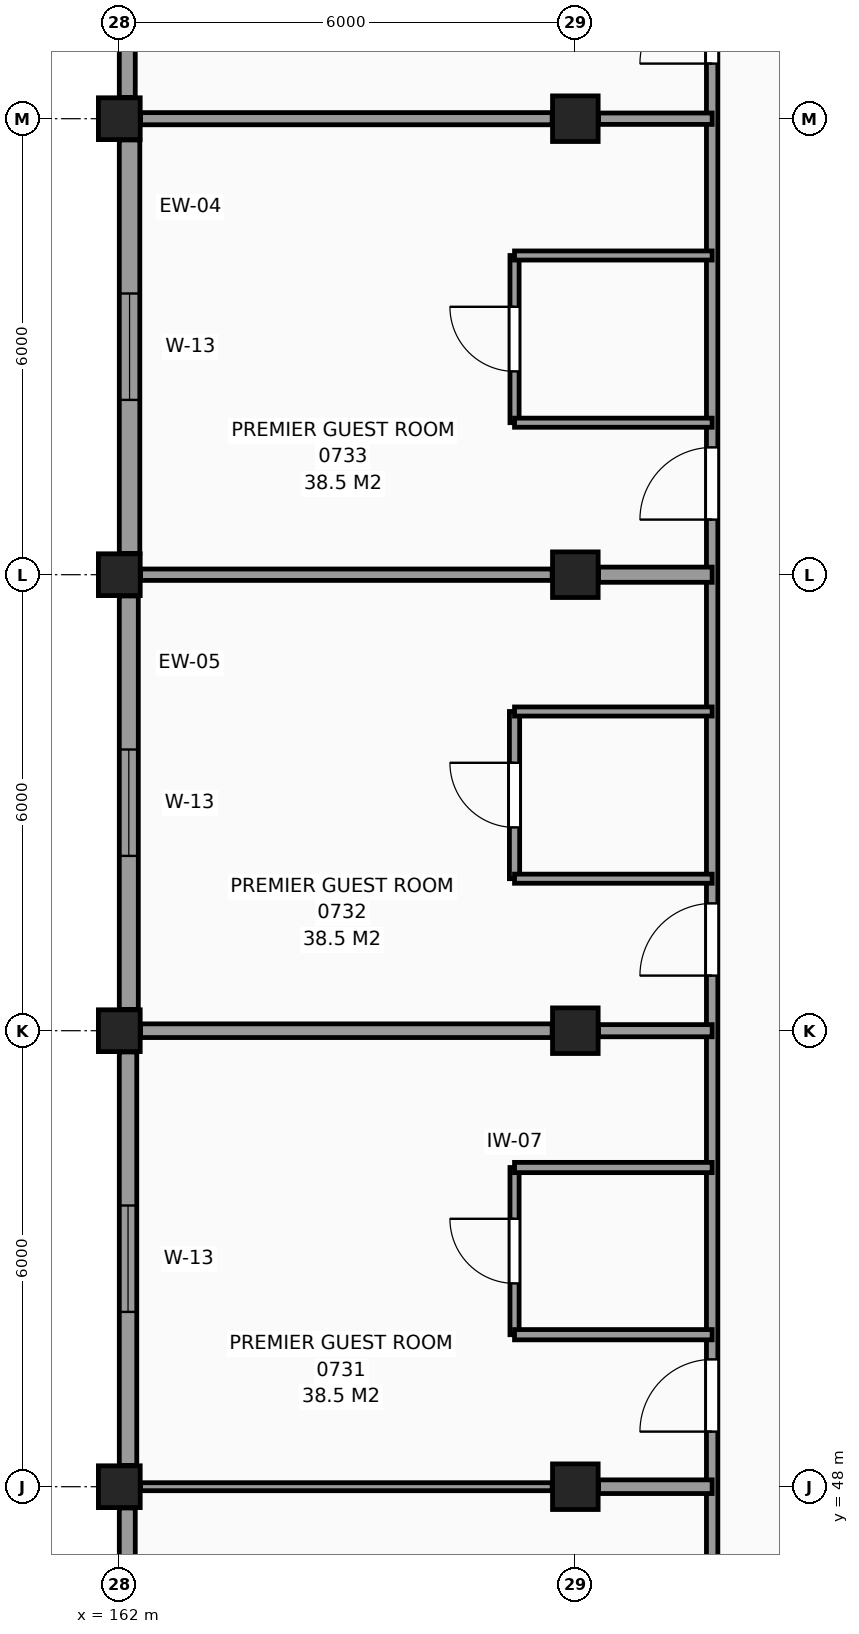
"""IFC4 building model, lengths in metres.
Left out: names, types, materials, properties, quantities, classifications, styles, units other than length and angle.
Written with IfcOpenShell. Run it as: python <this file> out.ifc"""

import sys

from ifc_helpers import new_model, si_unit, direction, frame, frame_2d, origin, origin_2d, place, context, subcontext, project, spatial, rectangle, extrude, element, fill, save


model = new_model("IFC4")
c1 = context("Model", 3, precision=1e-05, world=origin(), true_north=direction((0.0, 1.0)))
c2 = subcontext(c1, "Body", "Model", "MODEL_VIEW")
j1 = project(units=[si_unit("LENGTHUNIT", "METRE"), si_unit("PLANEANGLEUNIT", "RADIAN")], contexts=[c1])
p1 = place(None, origin())
s1 = spatial("IfcSite", under=j1, at=p1, CompositionType="ELEMENT")
p2 = place(p1, origin())
s2 = spatial("IfcBuilding", under=s1, at=p2, CompositionType="ELEMENT")
p3 = place(p2, frame((0.0, 0.0, 31.5)))
s3 = spatial("IfcBuildingStorey", under=s2, at=p3, CompositionType="ELEMENT", Elevation=31.5)
for number, where, z_axis, x_axis in (
    (1, (162.0, 48.0, 0.0), (0.0, 0.0, 1.0), (1.0, 0.0, 0.0)),
    (2, (162.0, 54.0, 0.0), (0.0, 0.0, 1.0), (1.0, 0.0, 0.0)),
    (3, (162.0, 60.0, 0.0), (0.0, 0.0, 1.0), (1.0, 0.0, 0.0)),
    (4, (162.0, 66.0, 0.0), (0.0, 0.0, 1.0), (1.0, 0.0, 0.0)),
):
    element("IfcColumn", number, at=place(p3, frame(where, z_axis=z_axis, x_axis=x_axis)), inside=s3, PredefinedType="COLUMN", context=c2, shape_type="SweptSolid", body=[
        extrude(rectangle(XDim=0.55, YDim=0.55, at=origin_2d()), origin(), (0.0, 0.0, 1.0), 3.3),
    ])
for number, where, z_axis, x_axis in (
    (5, (168.0, 48.0, 0.0), (0.0, 0.0, 1.0), (1.0, 0.0, 0.0)),
    (6, (168.0, 54.0, 0.0), (0.0, 0.0, 1.0), (1.0, 0.0, 0.0)),
    (7, (168.0, 60.0, 0.0), (0.0, 0.0, 1.0), (1.0, 0.0, 0.0)),
    (8, (168.0, 66.0, 0.0), (0.0, 0.0, 1.0), (1.0, 0.0, 0.0)),
):
    element("IfcColumn", number, at=place(p3, frame(where, z_axis=z_axis, x_axis=x_axis)), inside=s3, PredefinedType="COLUMN", context=c2, shape_type="SweptSolid", body=[
        extrude(rectangle(XDim=0.6, YDim=0.6, at=origin_2d()), origin(), (0.0, 0.0, 1.0), 3.3),
    ])
p4 = place(p3, frame((162.105, 71.72, 0.0), z_axis=(0.0, 0.0, 1.0), x_axis=(0.0, -1.0, 0.0)))
e9 = element("IfcWall", 9, at=p4, inside=s3, PredefinedType="SOLIDWALL", context=c2, shape_type="SweptSolid", body=[
    extrude(rectangle(XDim=5.44, YDim=0.21, at=frame_2d((2.72, 0.0))), origin(), (0.0, 0.0, 1.0), 2.42),
])
p5 = place(p4, frame((2.02, 0.0, 0.8)))
e10 = element("IfcOpeningElement", 10, at=p5, cuts=e9, PredefinedType="OPENING", context=c2, shape_type="SweptSolid", body=[
    extrude(rectangle(XDim=1.4, YDim=1.4, at=frame_2d((0.7, 0.7))), frame((0.0, 0.115, 0.0), z_axis=(0.0, -1.0, 0.0), x_axis=(1.0, 0.0, 0.0)), (0.0, 0.0, 1.0), 0.23),
])
p6 = place(p3, frame((162.135, 65.72, 0.0), z_axis=(0.0, 0.0, 1.0), x_axis=(0.0, -1.0, 0.0)))
e11 = element("IfcWall", 11, at=p6, inside=s3, PredefinedType="SOLIDWALL", context=c2, shape_type="SweptSolid", body=[
    extrude(rectangle(XDim=5.44, YDim=0.27, at=frame_2d((2.72, 0.0))), origin(), (0.0, 0.0, 1.0), 2.42),
])
p7 = place(p6, frame((2.02, 0.0, 0.8)))
e12 = element("IfcOpeningElement", 12, at=p7, cuts=e11, PredefinedType="OPENING", context=c2, shape_type="SweptSolid", body=[
    extrude(rectangle(XDim=1.4, YDim=1.4, at=frame_2d((0.7, 0.7))), frame((0.0, 0.145, 0.0), z_axis=(0.0, -1.0, 0.0), x_axis=(1.0, 0.0, 0.0)), (0.0, 0.0, 1.0), 0.29),
])
p8 = place(p3, frame((162.125, 59.72, 0.0), z_axis=(0.0, 0.0, 1.0), x_axis=(0.0, -1.0, 0.0)))
e13 = element("IfcWall", 13, at=p8, inside=s3, PredefinedType="SOLIDWALL", context=c2, shape_type="SweptSolid", body=[
    extrude(rectangle(XDim=5.44, YDim=0.25, at=frame_2d((2.72, 0.0))), origin(), (0.0, 0.0, 1.0), 2.42),
])
p9 = place(p8, frame((2.02, 0.0, 0.8)))
e14 = element("IfcOpeningElement", 14, at=p9, cuts=e13, PredefinedType="OPENING", context=c2, shape_type="SweptSolid", body=[
    extrude(rectangle(XDim=1.4, YDim=1.4, at=frame_2d((0.7, 0.7))), frame((0.0, 0.135, 0.0), z_axis=(0.0, -1.0, 0.0), x_axis=(1.0, 0.0, 0.0)), (0.0, 0.0, 1.0), 0.27),
])
p10 = place(p3, frame((162.115, 53.72, 0.0), z_axis=(0.0, 0.0, 1.0), x_axis=(0.0, -1.0, 0.0)))
e15 = element("IfcWall", 15, at=p10, inside=s3, PredefinedType="SOLIDWALL", context=c2, shape_type="SweptSolid", body=[
    extrude(rectangle(XDim=5.44, YDim=0.23, at=frame_2d((2.72, 0.0))), origin(), (0.0, 0.0, 1.0), 2.42),
])
p11 = place(p10, frame((2.02, 0.0, 0.8)))
e16 = element("IfcOpeningElement", 16, at=p11, cuts=e15, PredefinedType="OPENING", context=c2, shape_type="SweptSolid", body=[
    extrude(rectangle(XDim=1.4, YDim=1.4, at=frame_2d((0.7, 0.7))), frame((0.0, 0.125, 0.0), z_axis=(0.0, -1.0, 0.0), x_axis=(1.0, 0.0, 0.0)), (0.0, 0.0, 1.0), 0.25),
])
p12 = place(p3, frame((162.105, 47.72, 0.0), z_axis=(0.0, 0.0, 1.0), x_axis=(0.0, -1.0, 0.0)))
e17 = element("IfcWall", 17, at=p12, inside=s3, PredefinedType="SOLIDWALL", context=c2, shape_type="SweptSolid", body=[
    extrude(rectangle(XDim=5.44, YDim=0.21, at=frame_2d((2.72, 0.0))), origin(), (0.0, 0.0, 1.0), 2.42),
])
p13 = place(p12, frame((2.02, 0.0, 0.8)))
e18 = element("IfcOpeningElement", 18, at=p13, cuts=e17, PredefinedType="OPENING", context=c2, shape_type="SweptSolid", body=[
    extrude(rectangle(XDim=1.4, YDim=1.4, at=frame_2d((0.7, 0.7))), frame((0.0, 0.115, 0.0), z_axis=(0.0, -1.0, 0.0), x_axis=(1.0, 0.0, 0.0)), (0.0, 0.0, 1.0), 0.23),
])
p14 = place(p3, frame((167.2, 50.0, 0.0), z_axis=(0.0, 0.0, 1.0), x_axis=(0.0, 1.0, 0.0)))
e19 = element("IfcWall", 19, at=p14, inside=s3, PredefinedType="PARTITIONING", context=c2, shape_type="SweptSolid", body=[
    extrude(rectangle(XDim=2.2, YDim=0.12, at=frame_2d((1.1, 0.0))), origin(), (0.0, 0.0, 1.0), 3.07),
])
p15 = place(p14, frame((0.675, 0.0, 0.0)))
e20 = element("IfcOpeningElement", 20, at=p15, cuts=e19, PredefinedType="OPENING", context=c2, shape_type="SweptSolid", body=[
    extrude(rectangle(XDim=0.85, YDim=2.1, at=frame_2d((0.425, 1.05))), frame((0.0, 0.07, 0.0), z_axis=(0.0, -1.0, 0.0), x_axis=(1.0, 0.0, 0.0)), (0.0, 0.0, 1.0), 0.14),
])
p16 = place(p3, frame((167.2, 56.0, 0.0), z_axis=(0.0, 0.0, 1.0), x_axis=(0.0, 1.0, 0.0)))
e21 = element("IfcWall", 21, at=p16, inside=s3, PredefinedType="PARTITIONING", context=c2, shape_type="SweptSolid", body=[
    extrude(rectangle(XDim=2.2, YDim=0.135, at=frame_2d((1.1, 0.0))), origin(), (0.0, 0.0, 1.0), 3.07),
])
p17 = place(p16, frame((0.675, 0.0, 0.0)))
e22 = element("IfcOpeningElement", 22, at=p17, cuts=e21, PredefinedType="OPENING", context=c2, shape_type="SweptSolid", body=[
    extrude(rectangle(XDim=0.85, YDim=2.1, at=frame_2d((0.425, 1.05))), frame((0.0, 0.078, 0.0), z_axis=(0.0, -1.0, 0.0), x_axis=(1.0, 0.0, 0.0)), (0.0, 0.0, 1.0), 0.155),
])
p18 = place(p3, frame((167.2, 62.0, 0.0), z_axis=(0.0, 0.0, 1.0), x_axis=(0.0, 1.0, 0.0)))
e23 = element("IfcWall", 23, at=p18, inside=s3, PredefinedType="PARTITIONING", context=c2, shape_type="SweptSolid", body=[
    extrude(rectangle(XDim=2.2, YDim=0.12, at=frame_2d((1.1, 0.0))), origin(), (0.0, 0.0, 1.0), 3.07),
])
p19 = place(p18, frame((0.675, 0.0, 0.0)))
e24 = element("IfcOpeningElement", 24, at=p19, cuts=e23, PredefinedType="OPENING", context=c2, shape_type="SweptSolid", body=[
    extrude(rectangle(XDim=0.85, YDim=2.1, at=frame_2d((0.425, 1.05))), frame((0.0, 0.07, 0.0), z_axis=(0.0, -1.0, 0.0), x_axis=(1.0, 0.0, 0.0)), (0.0, 0.0, 1.0), 0.14),
])
p20 = place(p3, frame((169.8, 42.255, 0.0), z_axis=(0.0, 0.0, 1.0), x_axis=(0.0, 1.0, 0.0)))
e25 = element("IfcWall", 25, at=p20, inside=s3, PredefinedType="PARTITIONING", context=c2, shape_type="SweptSolid", body=[
    extrude(rectangle(XDim=65.565, YDim=0.15, at=frame_2d((32.783, 0.0))), origin(), (0.0, 0.0, 1.0), 3.07),
])
p21 = place(p20, frame((50.145, 0.0, 0.0)))
e26 = element("IfcOpeningElement", 26, at=p21, cuts=e25, PredefinedType="OPENING", context=c2, shape_type="SweptSolid", body=[
    extrude(rectangle(XDim=1.2, YDim=2.2, at=frame_2d((0.6, 1.1))), frame((0.0, 0.085, 0.0), z_axis=(0.0, -1.0, 0.0), x_axis=(1.0, 0.0, 0.0)), (0.0, 0.0, 1.0), 0.17),
])
p22 = place(p20, frame((0.42, 0.0, 0.0)))
e27 = element("IfcOpeningElement", 27, at=p22, cuts=e25, PredefinedType="OPENING", context=c2, shape_type="SweptSolid", body=[
    extrude(rectangle(XDim=0.95, YDim=2.1, at=frame_2d((0.475, 1.05))), frame((0.0, 0.085, 0.0), z_axis=(0.0, -1.0, 0.0), x_axis=(1.0, 0.0, 0.0)), (0.0, 0.0, 1.0), 0.17),
])
p23 = place(p20, frame((6.47, 0.0, 0.0)))
e28 = element("IfcOpeningElement", 28, at=p23, cuts=e25, PredefinedType="OPENING", context=c2, shape_type="SweptSolid", body=[
    extrude(rectangle(XDim=0.95, YDim=2.1, at=frame_2d((0.475, 1.05))), frame((0.0, 0.085, 0.0), z_axis=(0.0, -1.0, 0.0), x_axis=(1.0, 0.0, 0.0)), (0.0, 0.0, 1.0), 0.17),
])
p24 = place(p20, frame((12.47, 0.0, 0.0)))
e29 = element("IfcOpeningElement", 29, at=p24, cuts=e25, PredefinedType="OPENING", context=c2, shape_type="SweptSolid", body=[
    extrude(rectangle(XDim=0.95, YDim=2.1, at=frame_2d((0.475, 1.05))), frame((0.0, 0.085, 0.0), z_axis=(0.0, -1.0, 0.0), x_axis=(1.0, 0.0, 0.0)), (0.0, 0.0, 1.0), 0.17),
])
p25 = place(p20, frame((18.47, 0.0, 0.0)))
e30 = element("IfcOpeningElement", 30, at=p25, cuts=e25, PredefinedType="OPENING", context=c2, shape_type="SweptSolid", body=[
    extrude(rectangle(XDim=0.95, YDim=2.1, at=frame_2d((0.475, 1.05))), frame((0.0, 0.085, 0.0), z_axis=(0.0, -1.0, 0.0), x_axis=(1.0, 0.0, 0.0)), (0.0, 0.0, 1.0), 0.17),
])
p26 = place(p20, frame((24.47, 0.0, 0.0)))
e31 = element("IfcOpeningElement", 31, at=p26, cuts=e25, PredefinedType="OPENING", context=c2, shape_type="SweptSolid", body=[
    extrude(rectangle(XDim=0.95, YDim=2.1, at=frame_2d((0.475, 1.05))), frame((0.0, 0.085, 0.0), z_axis=(0.0, -1.0, 0.0), x_axis=(1.0, 0.0, 0.0)), (0.0, 0.0, 1.0), 0.17),
])
p27 = place(p20, frame((30.47, 0.0, 0.0)))
e32 = element("IfcOpeningElement", 32, at=p27, cuts=e25, PredefinedType="OPENING", context=c2, shape_type="SweptSolid", body=[
    extrude(rectangle(XDim=0.95, YDim=2.1, at=frame_2d((0.475, 1.05))), frame((0.0, 0.085, 0.0), z_axis=(0.0, -1.0, 0.0), x_axis=(1.0, 0.0, 0.0)), (0.0, 0.0, 1.0), 0.17),
])
p28 = place(p20, frame((54.47, 0.0, 0.0)))
e33 = element("IfcOpeningElement", 33, at=p28, cuts=e25, PredefinedType="OPENING", context=c2, shape_type="SweptSolid", body=[
    extrude(rectangle(XDim=0.95, YDim=2.1, at=frame_2d((0.475, 1.05))), frame((0.0, 0.085, 0.0), z_axis=(0.0, -1.0, 0.0), x_axis=(1.0, 0.0, 0.0)), (0.0, 0.0, 1.0), 0.17),
])
p29 = place(p20, frame((60.47, 0.0, 0.0)))
e34 = element("IfcOpeningElement", 34, at=p29, cuts=e25, PredefinedType="OPENING", context=c2, shape_type="SweptSolid", body=[
    extrude(rectangle(XDim=0.95, YDim=2.1, at=frame_2d((0.475, 1.05))), frame((0.0, 0.085, 0.0), z_axis=(0.0, -1.0, 0.0), x_axis=(1.0, 0.0, 0.0)), (0.0, 0.0, 1.0), 0.17),
])
p30 = place(p3, frame((162.28, 48.0, 0.0), z_axis=(0.0, 0.0, 1.0), x_axis=(1.0, 0.0, 0.0)))
e35 = element("IfcWall", 35, at=p30, inside=s3, PredefinedType="PARTITIONING", context=c2, shape_type="SweptSolid", body=[
    extrude(rectangle(XDim=5.415, YDim=0.105, at=frame_2d((2.708, 0.0))), origin(), (0.0, 0.0, 1.0), 2.27),
])
p31 = place(p3, frame((168.305, 48.0, 0.0), z_axis=(0.0, 0.0, 1.0), x_axis=(1.0, 0.0, 0.0)))
e36 = element("IfcWall", 36, at=p31, inside=s3, PredefinedType="PARTITIONING", context=c2, shape_type="SweptSolid", body=[
    extrude(rectangle(XDim=1.495, YDim=0.18, at=frame_2d((0.748, 0.0))), origin(), (0.0, 0.0, 1.0), 2.37),
])
for number, where, z_axis, x_axis in (
    (37, (167.2, 50.0, 0.0), (0.0, 0.0, 1.0), (1.0, 0.0, 0.0)),
    (38, (167.2, 52.2, 0.0), (0.0, 0.0, 1.0), (1.0, 0.0, 0.0)),
):
    element("IfcWall", number, at=place(p3, frame(where, z_axis=z_axis, x_axis=x_axis)), inside=s3, PredefinedType="PARTITIONING", context=c2, shape_type="SweptSolid", body=[
        extrude(rectangle(XDim=2.6, YDim=0.135, at=frame_2d((1.3, 0.0))), origin(), (0.0, 0.0, 1.0), 3.07),
    ])
p32 = place(p3, frame((162.28, 54.0, 0.0), z_axis=(0.0, 0.0, 1.0), x_axis=(1.0, 0.0, 0.0)))
e39 = element("IfcWall", 39, at=p32, inside=s3, PredefinedType="PARTITIONING", context=c2, shape_type="SweptSolid", body=[
    extrude(rectangle(XDim=5.415, YDim=0.18, at=frame_2d((2.708, 0.0))), origin(), (0.0, 0.0, 1.0), 2.27),
])
p33 = place(p3, frame((168.305, 54.0, 0.0), z_axis=(0.0, 0.0, 1.0), x_axis=(1.0, 0.0, 0.0)))
e40 = element("IfcWall", 40, at=p33, inside=s3, PredefinedType="PARTITIONING", context=c2, shape_type="SweptSolid", body=[
    extrude(rectangle(XDim=1.495, YDim=0.16, at=frame_2d((0.748, 0.0))), origin(), (0.0, 0.0, 1.0), 2.27),
])
for number, where, z_axis, x_axis in (
    (41, (167.2, 56.0, 0.0), (0.0, 0.0, 1.0), (1.0, 0.0, 0.0)),
    (42, (167.2, 58.2, 0.0), (0.0, 0.0, 1.0), (1.0, 0.0, 0.0)),
):
    element("IfcWall", number, at=place(p3, frame(where, z_axis=z_axis, x_axis=x_axis)), inside=s3, PredefinedType="PARTITIONING", context=c2, shape_type="SweptSolid", body=[
        extrude(rectangle(XDim=2.6, YDim=0.12, at=frame_2d((1.3, 0.0))), origin(), (0.0, 0.0, 1.0), 3.07),
    ])
p34 = place(p3, frame((162.28, 60.0, 0.0), z_axis=(0.0, 0.0, 1.0), x_axis=(1.0, 0.0, 0.0)))
e43 = element("IfcWall", 43, at=p34, inside=s3, PredefinedType="PARTITIONING", context=c2, shape_type="SweptSolid", body=[
    extrude(rectangle(XDim=5.415, YDim=0.15, at=frame_2d((2.708, 0.0))), origin(), (0.0, 0.0, 1.0), 2.27),
])
p35 = place(p3, frame((168.305, 60.0, 0.0), z_axis=(0.0, 0.0, 1.0), x_axis=(1.0, 0.0, 0.0)))
e44 = element("IfcWall", 44, at=p35, inside=s3, PredefinedType="PARTITIONING", context=c2, shape_type="SweptSolid", body=[
    extrude(rectangle(XDim=1.495, YDim=0.2, at=frame_2d((0.748, 0.0))), origin(), (0.0, 0.0, 1.0), 2.27),
])
for number, where, z_axis, x_axis in (
    (45, (167.2, 62.0, 0.0), (0.0, 0.0, 1.0), (1.0, 0.0, 0.0)),
    (46, (167.2, 64.2, 0.0), (0.0, 0.0, 1.0), (1.0, 0.0, 0.0)),
):
    element("IfcWall", number, at=place(p3, frame(where, z_axis=z_axis, x_axis=x_axis)), inside=s3, PredefinedType="PARTITIONING", context=c2, shape_type="SweptSolid", body=[
        extrude(rectangle(XDim=2.6, YDim=0.12, at=frame_2d((1.3, 0.0))), origin(), (0.0, 0.0, 1.0), 3.07),
    ])
p36 = place(p3, frame((162.28, 66.0, 0.0), z_axis=(0.0, 0.0, 1.0), x_axis=(1.0, 0.0, 0.0)))
e47 = element("IfcWall", 47, at=p36, inside=s3, PredefinedType="PARTITIONING", context=c2, shape_type="SweptSolid", body=[
    extrude(rectangle(XDim=5.415, YDim=0.16, at=frame_2d((2.708, 0.0))), origin(), (0.0, 0.0, 1.0), 2.27),
])
p37 = place(p3, frame((168.305, 66.0, 0.0), z_axis=(0.0, 0.0, 1.0), x_axis=(1.0, 0.0, 0.0)))
e48 = element("IfcWall", 48, at=p37, inside=s3, PredefinedType="PARTITIONING", context=c2, shape_type="SweptSolid", body=[
    extrude(rectangle(XDim=1.495, YDim=0.15, at=frame_2d((0.748, 0.0))), origin(), (0.0, 0.0, 1.0), 2.27),
])
p38 = place(p11, origin())
e49 = element("IfcWindow", 49, at=p38, inside=s3, PartitioningType="SINGLE_PANEL", PredefinedType="WINDOW", context=c2, shape_type="SweptSolid", body=[
    extrude(rectangle(XDim=1.4, YDim=1.4, at=frame_2d((0.7, 0.7))), frame((0.0, 0.03, 0.0), z_axis=(0.0, -1.0, 0.0), x_axis=(1.0, 0.0, 0.0)), (0.0, 0.0, 1.0), 0.06),
])
fill(e16, e49)
p39 = place(p9, origin())
e50 = element("IfcWindow", 50, at=p39, inside=s3, PartitioningType="SINGLE_PANEL", PredefinedType="WINDOW", context=c2, shape_type="SweptSolid", body=[
    extrude(rectangle(XDim=1.4, YDim=1.4, at=frame_2d((0.7, 0.7))), frame((0.0, 0.03, 0.0), z_axis=(0.0, -1.0, 0.0), x_axis=(1.0, 0.0, 0.0)), (0.0, 0.0, 1.0), 0.06),
])
fill(e14, e50)
p40 = place(p7, origin())
e51 = element("IfcWindow", 51, at=p40, inside=s3, PartitioningType="SINGLE_PANEL", PredefinedType="WINDOW", context=c2, shape_type="SweptSolid", body=[
    extrude(rectangle(XDim=1.4, YDim=1.4, at=frame_2d((0.7, 0.7))), frame((0.0, 0.03, 0.0), z_axis=(0.0, -1.0, 0.0), x_axis=(1.0, 0.0, 0.0)), (0.0, 0.0, 1.0), 0.06),
])
fill(e12, e51)
p41 = place(p15, origin())
e52 = element("IfcDoor", 52, at=p41, inside=s3, OperationType="SINGLE_SWING_RIGHT", PredefinedType="DOOR", context=c2, shape_type="SweptSolid", body=[
    extrude(rectangle(XDim=0.85, YDim=2.1, at=frame_2d((0.425, 1.05))), frame((0.0, 0.025, 0.0), z_axis=(0.0, -1.0, 0.0), x_axis=(1.0, 0.0, 0.0)), (0.0, 0.0, 1.0), 0.05),
])
fill(e20, e52)
p42 = place(p23, origin())
e53 = element("IfcDoor", 53, at=p42, inside=s3, OperationType="SINGLE_SWING_LEFT", PredefinedType="DOOR", context=c2, shape_type="SweptSolid", body=[
    extrude(rectangle(XDim=0.95, YDim=2.1, at=frame_2d((0.475, 1.05))), frame((0.0, 0.025, 0.0), z_axis=(0.0, -1.0, 0.0), x_axis=(1.0, 0.0, 0.0)), (0.0, 0.0, 1.0), 0.05),
])
fill(e28, e53)
p43 = place(p17, origin())
e54 = element("IfcDoor", 54, at=p43, inside=s3, OperationType="SINGLE_SWING_RIGHT", PredefinedType="DOOR", context=c2, shape_type="SweptSolid", body=[
    extrude(rectangle(XDim=0.85, YDim=2.1, at=frame_2d((0.425, 1.05))), frame((0.0, 0.025, 0.0), z_axis=(0.0, -1.0, 0.0), x_axis=(1.0, 0.0, 0.0)), (0.0, 0.0, 1.0), 0.05),
])
fill(e22, e54)
p44 = place(p24, origin())
e55 = element("IfcDoor", 55, at=p44, inside=s3, OperationType="SINGLE_SWING_LEFT", PredefinedType="DOOR", context=c2, shape_type="SweptSolid", body=[
    extrude(rectangle(XDim=0.95, YDim=2.1, at=frame_2d((0.475, 1.05))), frame((0.0, 0.025, 0.0), z_axis=(0.0, -1.0, 0.0), x_axis=(1.0, 0.0, 0.0)), (0.0, 0.0, 1.0), 0.05),
])
fill(e29, e55)
p45 = place(p19, origin())
e56 = element("IfcDoor", 56, at=p45, inside=s3, OperationType="SINGLE_SWING_RIGHT", PredefinedType="DOOR", context=c2, shape_type="SweptSolid", body=[
    extrude(rectangle(XDim=0.85, YDim=2.1, at=frame_2d((0.425, 1.05))), frame((0.0, 0.025, 0.0), z_axis=(0.0, -1.0, 0.0), x_axis=(1.0, 0.0, 0.0)), (0.0, 0.0, 1.0), 0.05),
])
fill(e24, e56)
p46 = place(p25, origin())
e57 = element("IfcDoor", 57, at=p46, inside=s3, OperationType="SINGLE_SWING_LEFT", PredefinedType="DOOR", context=c2, shape_type="SweptSolid", body=[
    extrude(rectangle(XDim=0.95, YDim=2.1, at=frame_2d((0.475, 1.05))), frame((0.0, 0.025, 0.0), z_axis=(0.0, -1.0, 0.0), x_axis=(1.0, 0.0, 0.0)), (0.0, 0.0, 1.0), 0.05),
])
fill(e30, e57)
p47 = place(p26, origin())
e58 = element("IfcDoor", 58, at=p47, inside=s3, OperationType="SINGLE_SWING_LEFT", PredefinedType="DOOR", context=c2, shape_type="SweptSolid", body=[
    extrude(rectangle(XDim=0.95, YDim=2.1, at=frame_2d((0.475, 1.05))), frame((0.0, 0.025, 0.0), z_axis=(0.0, -1.0, 0.0), x_axis=(1.0, 0.0, 0.0)), (0.0, 0.0, 1.0), 0.05),
])
fill(e31, e58)
save(model, sys.argv[1])
